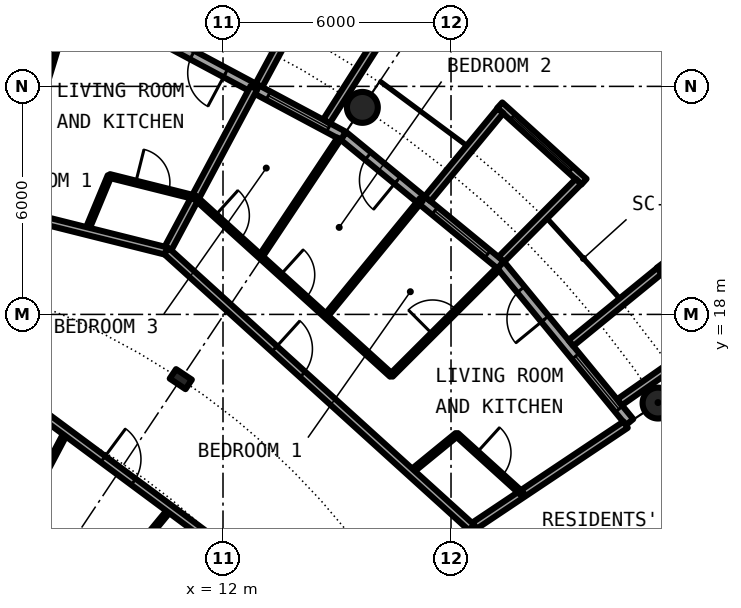
"""IFC4 building model, lengths in metres.
Left out: names, types, materials, properties, quantities, classifications, styles, units other than length and angle.
Written with IfcOpenShell. Run it as: python <this file> out.ifc"""

import sys

from ifc_helpers import new_model, si_unit, direction, frame, frame_2d, origin, origin_2d, place, context, subcontext, project, spatial, rectangle, circle, hollow_circle, i_section, extrude, element, fill, save


model = new_model("IFC4")
c1 = context("Model", 3, precision=1e-05, world=origin(), true_north=direction((0.0, 1.0)))
c2 = subcontext(c1, "Body", "Model", "MODEL_VIEW")
j1 = project(units=[si_unit("LENGTHUNIT", "METRE"), si_unit("PLANEANGLEUNIT", "RADIAN")], contexts=[c1])
p1 = place(None, origin())
s1 = spatial("IfcSite", under=j1, at=p1, CompositionType="ELEMENT")
p2 = place(p1, origin())
s2 = spatial("IfcBuilding", under=s1, at=p2, CompositionType="ELEMENT")
p3 = place(p2, frame((0.0, 0.0, 151.3)))
s3 = spatial("IfcBuildingStorey", under=s2, at=p3, CompositionType="ELEMENT", Elevation=151.3)
for number, where, z_axis, x_axis in (
    (1, (23.448, 15.667, 0.0), (0.0, 0.0, 1.0), (1.0, 0.0, 0.0)),
    (2, (15.667, 23.448, 0.0), (0.0, 0.0, 1.0), (1.0, 0.0, 0.0)),
):
    element("IfcColumn", number, at=place(p3, frame(where, z_axis=z_axis, x_axis=x_axis)), inside=s3, PredefinedType="COLUMN", context=c2, shape_type="SweptSolid", body=[
        extrude(hollow_circle(Radius=0.406, WallThickness=0.04, at=origin_2d()), origin(), (0.0, 0.0, 1.0), 3.05),
    ])
p4 = place(p3, frame((10.889, 16.297, 0.0), z_axis=(0.0, 0.0, 1.0), x_axis=(0.55557023302, 0.831469612303, 0.0)))
e3 = element("IfcColumn", 3, at=p4, inside=s3, PredefinedType="COLUMN", context=c2, shape_type="SweptSolid", body=[
    extrude(i_section(OverallWidth=0.3, OverallDepth=0.5, WebThickness=0.014, FlangeThickness=0.028, FilletRadius=0.027, at=origin_2d()), origin(), (0.0, 0.0, 1.0), 3.05),
])
p5 = place(p3, frame((22.699, 15.167, 0.0), z_axis=(0.0, 0.0, 1.0), x_axis=(-0.634382322723, 0.773019449054, 0.0)))
e4 = element("IfcWall", 4, at=p5, inside=s3, PredefinedType="SOLIDWALL", context=c2, shape_type="SweptSolid", body=[
    extrude(rectangle(XDim=5.352, YDim=0.25, at=frame_2d((2.676, 0.0))), origin(), (0.0, 0.0, 1.0), 2.7),
])
p6 = place(p5, frame((0.441, 0.0, 0.3)))
e5 = element("IfcOpeningElement", 5, at=p6, cuts=e4, PredefinedType="OPENING", context=c2, shape_type="SweptSolid", body=[
    extrude(rectangle(XDim=1.8, YDim=2.1, at=frame_2d((0.9, 1.05))), frame((0.0, 0.135, 0.0), z_axis=(0.0, -1.0, 0.0), x_axis=(1.0, 0.0, 0.0)), (0.0, 0.0, 1.0), 0.27),
])
p7 = place(p5, frame((3.51, 0.0, 0.0)))
e6 = element("IfcOpeningElement", 6, at=p7, cuts=e4, PredefinedType="OPENING", context=c2, shape_type="SweptSolid", body=[
    extrude(rectangle(XDim=1.0, YDim=2.2, at=frame_2d((0.5, 1.1))), frame((0.0, 0.135, 0.0), z_axis=(0.0, -1.0, 0.0), x_axis=(1.0, 0.0, 0.0)), (0.0, 0.0, 1.0), 0.27),
])
p8 = place(p3, frame((24.972, 17.337, -0.03), z_axis=(0.0, 0.0, 1.0), x_axis=(-0.602806268067, 0.797887588059, 0.0)))
e7 = element("IfcWall", 7, at=p8, inside=s3, PredefinedType="SOLIDWALL", context=c2, shape_type="SweptSolid", body=[
    extrude(rectangle(XDim=2.447, YDim=0.2, at=frame_2d((1.223, 0.0))), origin(), (0.0, 0.0, 1.0), 2.73),
])
p9 = place(p8, frame((0.183, 0.0, 0.33)))
e8 = element("IfcOpeningElement", 8, at=p9, cuts=e7, PredefinedType="OPENING", context=c2, shape_type="SweptSolid", body=[
    extrude(circle(Radius=1.04, at=frame_2d((1.04, 1.04))), frame((0.0, 0.11, 0.0), z_axis=(0.0, -1.0, 0.0), x_axis=(1.0, 0.0, 0.0)), (0.0, 0.0, 1.0), 0.22),
])
p10 = place(p3, frame((22.433, 15.688, -0.03), z_axis=(0.0, 0.0, 1.0), x_axis=(0.819373043115, 0.573260687834, 0.0)))
e9 = element("IfcWall", 9, at=p10, inside=s3, PredefinedType="SOLIDWALL", context=c2, shape_type="SweptSolid", body=[
    extrude(rectangle(XDim=2.925, YDim=0.2, at=frame_2d((1.463, 0.0))), origin(), (0.0, 0.0, 1.0), 2.73),
])
p11 = place(p3, frame((21.155, 17.246, -0.03), z_axis=(0.0, 0.0, 1.0), x_axis=(0.775179004516, 0.631741648902, 0.0)))
e10 = element("IfcWall", 10, at=p11, inside=s3, PredefinedType="SOLIDWALL", context=c2, shape_type="SweptSolid", body=[
    extrude(rectangle(XDim=3.006, YDim=0.2, at=frame_2d((1.503, 0.0))), origin(), (0.0, 0.0, 1.0), 2.73),
])
p12 = place(p3, frame((19.304, 19.304, 0.0), z_axis=(0.0, 0.0, 1.0), x_axis=(-0.773019449054, 0.634382322723, 0.0)))
e11 = element("IfcWall", 11, at=p12, inside=s3, PredefinedType="SOLIDWALL", context=c2, shape_type="SweptSolid", body=[
    extrude(rectangle(XDim=5.352, YDim=0.25, at=frame_2d((2.676, 0.0))), origin(), (0.0, 0.0, 1.0), 2.7),
])
p13 = place(p12, frame((0.441, 0.0, 0.3)))
e12 = element("IfcOpeningElement", 12, at=p13, cuts=e11, PredefinedType="OPENING", context=c2, shape_type="SweptSolid", body=[
    extrude(rectangle(XDim=1.8, YDim=2.1, at=frame_2d((0.9, 1.05))), frame((0.0, 0.135, 0.0), z_axis=(0.0, -1.0, 0.0), x_axis=(1.0, 0.0, 0.0)), (0.0, 0.0, 1.0), 0.27),
])
p14 = place(p12, frame((3.51, 0.0, 0.0)))
e13 = element("IfcOpeningElement", 13, at=p14, cuts=e11, PredefinedType="OPENING", context=c2, shape_type="SweptSolid", body=[
    extrude(rectangle(XDim=1.0, YDim=2.2, at=frame_2d((0.5, 1.1))), frame((0.0, 0.135, 0.0), z_axis=(0.0, -1.0, 0.0), x_axis=(1.0, 0.0, 0.0)), (0.0, 0.0, 1.0), 0.27),
])
p15 = place(p3, frame((21.5, 21.493, -0.03), z_axis=(0.0, 0.0, 1.0), x_axis=(-0.740998365753, 0.671506829416, 0.0)))
e14 = element("IfcWall", 14, at=p15, inside=s3, PredefinedType="SOLIDWALL", context=c2, shape_type="SweptSolid", body=[
    extrude(rectangle(XDim=2.993, YDim=0.2, at=frame_2d((1.497, 0.0))), origin(), (0.0, 0.0, 1.0), 2.73),
])
p16 = place(p15, frame((0.457, 0.0, 0.33)))
e15 = element("IfcOpeningElement", 15, at=p16, cuts=e14, PredefinedType="OPENING", context=c2, shape_type="SweptSolid", body=[
    extrude(circle(Radius=1.04, at=frame_2d((1.04, 1.04))), frame((0.0, 0.11, 0.0), z_axis=(0.0, -1.0, 0.0), x_axis=(1.0, 0.0, 0.0)), (0.0, 0.0, 1.0), 0.22),
])
p17 = place(p3, frame((19.323, 19.45, -0.03), z_axis=(0.0, 0.0, 1.0), x_axis=(0.704476739375, 0.709727076896, 0.0)))
e16 = element("IfcWall", 16, at=p17, inside=s3, PredefinedType="SOLIDWALL", context=c2, shape_type="SweptSolid", body=[
    extrude(rectangle(XDim=2.883, YDim=0.2, at=frame_2d((1.441, 0.0))), origin(), (0.0, 0.0, 1.0), 2.73),
])
p18 = place(p3, frame((17.384, 21.041, -0.03), z_axis=(0.0, 0.0, 1.0), x_axis=(0.63709551667, 0.770784861449, 0.0)))
e17 = element("IfcWall", 17, at=p18, inside=s3, PredefinedType="SOLIDWALL", context=c2, shape_type="SweptSolid", body=[
    extrude(rectangle(XDim=3.006, YDim=0.2, at=frame_2d((1.503, 0.0))), origin(), (0.0, 0.0, 1.0), 2.73),
])
p19 = place(p3, frame((15.167, 22.699, 0.0), z_axis=(0.0, 0.0, 1.0), x_axis=(-0.881915646801, 0.471407246368, 0.0)))
e18 = element("IfcWall", 18, at=p19, inside=s3, PredefinedType="SOLIDWALL", context=c2, shape_type="SweptSolid", body=[
    extrude(rectangle(XDim=5.352, YDim=0.25, at=frame_2d((2.676, 0.0))), origin(), (0.0, 0.0, 1.0), 2.7),
])
p20 = place(p19, frame((0.441, 0.0, 0.3)))
e19 = element("IfcOpeningElement", 19, at=p20, cuts=e18, PredefinedType="OPENING", context=c2, shape_type="SweptSolid", body=[
    extrude(rectangle(XDim=1.8, YDim=2.1, at=frame_2d((0.9, 1.05))), frame((0.0, 0.135, 0.0), z_axis=(0.0, -1.0, 0.0), x_axis=(1.0, 0.0, 0.0)), (0.0, 0.0, 1.0), 0.27),
])
p21 = place(p19, frame((3.51, 0.0, 0.0)))
e20 = element("IfcOpeningElement", 20, at=p21, cuts=e18, PredefinedType="OPENING", context=c2, shape_type="SweptSolid", body=[
    extrude(rectangle(XDim=1.0, YDim=2.2, at=frame_2d((0.5, 1.1))), frame((0.0, 0.135, 0.0), z_axis=(0.0, -1.0, 0.0), x_axis=(1.0, 0.0, 0.0)), (0.0, 0.0, 1.0), 0.27),
])
p22 = place(p3, frame((14.722, 23.079, -0.03), z_axis=(0.0, 0.0, 1.0), x_axis=(0.537572179146, 0.843217737129, 0.0)))
e21 = element("IfcWall", 21, at=p22, inside=s3, PredefinedType="SOLIDWALL", context=c2, shape_type="SweptSolid", body=[
    extrude(rectangle(XDim=2.924, YDim=0.2, at=frame_2d((1.462, 0.0))), origin(), (0.0, 0.0, 1.0), 2.73),
])
p23 = place(p3, frame((12.945, 24.029, -0.03), z_axis=(0.0, 0.0, 1.0), x_axis=(0.474424310775, 0.88029629861, 0.0)))
e22 = element("IfcWall", 22, at=p23, inside=s3, PredefinedType="SOLIDWALL", context=c2, shape_type="SweptSolid", body=[
    extrude(rectangle(XDim=3.006, YDim=0.2, at=frame_2d((1.503, 0.0))), origin(), (0.0, 0.0, 1.0), 2.73),
])
p24 = place(p3, frame((8.41, 20.193, 0.0), z_axis=(0.0, 0.0, 1.0), x_axis=(0.384228756538, 0.923237923099, 0.0)))
e23 = element("IfcWall", 23, at=p24, inside=s3, PredefinedType="PARTITIONING", context=c2, shape_type="SweptSolid", body=[
    extrude(rectangle(XDim=1.569, YDim=0.1, at=frame_2d((0.785, 0.0))), origin(), (0.0, 0.0, 1.0), 2.7),
])
p25 = place(p3, frame((4.909, 5.958, 0.0), z_axis=(0.0, 0.0, 1.0), x_axis=(0.635879010442, 0.771788756124, 0.0)))
e24 = element("IfcWall", 24, at=p25, inside=s3, PredefinedType="PARTITIONING", context=c2, shape_type="SweptSolid", body=[
    extrude(rectangle(XDim=8.967, YDim=0.1, at=frame_2d((4.484, 0.0))), origin(), (0.0, 0.0, 1.0), 2.7),
])
p26 = place(p25, frame((6.4, 0.0, 0.0)))
e25 = element("IfcOpeningElement", 25, at=p26, cuts=e24, PredefinedType="OPENING", context=c2, shape_type="SweptSolid", body=[
    extrude(rectangle(XDim=0.9, YDim=2.3, at=frame_2d((0.45, 1.15))), frame((0.0, 0.06, 0.0), z_axis=(0.0, -1.0, 0.0), x_axis=(1.0, 0.0, 0.0)), (0.0, 0.0, 1.0), 0.12),
])
p27 = place(p25, frame((1.917, 0.0, 0.0)))
e26 = element("IfcOpeningElement", 26, at=p27, cuts=e24, PredefinedType="OPENING", context=c2, shape_type="SweptSolid", body=[
    extrude(rectangle(XDim=0.9, YDim=2.3, at=frame_2d((0.45, 1.15))), frame((0.0, 0.06, 0.0), z_axis=(0.0, -1.0, 0.0), x_axis=(1.0, 0.0, 0.0)), (0.0, 0.0, 1.0), 0.12),
])
p28 = place(p3, frame((5.877, 11.125, 0.0), z_axis=(0.0, 0.0, 1.0), x_axis=(0.467030118529, 0.884241408432, 0.0)))
e27 = element("IfcWall", 27, at=p28, inside=s3, PredefinedType="PARTITIONING", context=c2, shape_type="SweptSolid", body=[
    extrude(rectangle(XDim=4.278, YDim=0.1, at=frame_2d((2.139, 0.0))), origin(), (0.0, 0.0, 1.0), 2.7),
])
p29 = place(p28, frame((1.689, 0.0, 0.0)))
e28 = element("IfcOpeningElement", 28, at=p29, cuts=e27, PredefinedType="OPENING", context=c2, shape_type="SweptSolid", body=[
    extrude(rectangle(XDim=0.9, YDim=2.3, at=frame_2d((0.45, 1.15))), frame((0.0, 0.06, 0.0), z_axis=(0.0, -1.0, 0.0), x_axis=(1.0, 0.0, 0.0)), (0.0, 0.0, 1.0), 0.12),
])
p30 = place(p3, frame((6.76, 22.207, 0.0), z_axis=(0.0, 0.0, 1.0), x_axis=(0.291291575636, 0.956634317785, 0.0)))
e29 = element("IfcWall", 29, at=p30, inside=s3, PredefinedType="PARTITIONING", context=c2, shape_type="SweptSolid", body=[
    extrude(rectangle(XDim=3.962, YDim=0.1, at=frame_2d((1.981, 0.0))), origin(), (0.0, 0.0, 1.0), 2.7),
])
p31 = place(p30, frame((1.531, 0.0, 0.0)))
e30 = element("IfcOpeningElement", 30, at=p31, cuts=e29, PredefinedType="OPENING", context=c2, shape_type="SweptSolid", body=[
    extrude(rectangle(XDim=0.9, YDim=2.3, at=frame_2d((0.45, 1.15))), frame((0.0, 0.06, 0.0), z_axis=(0.0, -1.0, 0.0), x_axis=(1.0, 0.0, 0.0)), (0.0, 0.0, 1.0), 0.12),
])
p32 = place(p3, frame((10.516, 19.665, 0.0), z_axis=(0.0, 0.0, 1.0), x_axis=(0.471388689095, 0.881925565903, 0.0)))
e31 = element("IfcWall", 31, at=p32, inside=s3, PredefinedType="PARTITIONING", context=c2, shape_type="SweptSolid", body=[
    extrude(rectangle(XDim=4.875, YDim=0.2, at=frame_2d((2.438, 0.0))), origin(), (0.0, 0.0, 1.0), 2.7),
])
p33 = place(p3, frame((12.988, 19.518, 0.0), z_axis=(0.0, 0.0, 1.0), x_axis=(0.553823887887, 0.83263383381, 0.0)))
e32 = element("IfcWall", 32, at=p33, inside=s3, PredefinedType="PARTITIONING", context=c2, shape_type="SweptSolid", body=[
    extrude(rectangle(XDim=3.73, YDim=0.1, at=frame_2d((1.865, 0.0))), origin(), (0.0, 0.0, 1.0), 2.7),
])
p34 = place(p3, frame((14.709, 17.958, 0.0), z_axis=(0.0, 0.0, 1.0), x_axis=(0.633590098448, 0.773668913133, 0.0)))
e33 = element("IfcWall", 33, at=p34, inside=s3, PredefinedType="PARTITIONING", context=c2, shape_type="SweptSolid", body=[
    extrude(rectangle(XDim=3.962, YDim=0.1, at=frame_2d((1.981, 0.0))), origin(), (0.0, 0.0, 1.0), 2.7),
])
p35 = place(p3, frame((16.43, 16.398, 0.0), z_axis=(0.0, 0.0, 1.0), x_axis=(0.707722727509, 0.706490297858, 0.0)))
e34 = element("IfcWall", 34, at=p35, inside=s3, PredefinedType="PARTITIONING", context=c2, shape_type="SweptSolid", body=[
    extrude(rectangle(XDim=3.962, YDim=0.1, at=frame_2d((1.981, 0.0))), origin(), (0.0, 0.0, 1.0), 2.7),
])
p36 = place(p35, frame((1.531, 0.0, 0.0)))
e35 = element("IfcOpeningElement", 35, at=p36, cuts=e34, PredefinedType="OPENING", context=c2, shape_type="SweptSolid", body=[
    extrude(rectangle(XDim=0.9, YDim=2.3, at=frame_2d((0.45, 1.15))), frame((0.0, 0.06, 0.0), z_axis=(0.0, -1.0, 0.0), x_axis=(1.0, 0.0, 0.0)), (0.0, 0.0, 1.0), 0.12),
])
p37 = place(p3, frame((16.936, 13.845, 0.0), z_axis=(0.0, 0.0, 1.0), x_axis=(0.774283039722, 0.632839453889, 0.0)))
e36 = element("IfcWall", 36, at=p37, inside=s3, PredefinedType="PARTITIONING", context=c2, shape_type="SweptSolid", body=[
    extrude(rectangle(XDim=1.569, YDim=0.1, at=frame_2d((0.785, 0.0))), origin(), (0.0, 0.0, 1.0), 2.7),
])
p38 = place(p3, frame((18.542, 12.389, 0.0), z_axis=(0.0, 0.0, 1.0), x_axis=(0.831387096605, 0.55569370664, 0.0)))
e37 = element("IfcWall", 37, at=p38, inside=s3, PredefinedType="PARTITIONING", context=c2, shape_type="SweptSolid", body=[
    extrude(rectangle(XDim=4.875, YDim=0.2, at=frame_2d((2.438, 0.0))), origin(), (0.0, 0.0, 1.0), 2.7),
])
p39 = place(p3, frame((5.137, 16.938, 0.0), z_axis=(0.0, 0.0, 1.0), x_axis=(0.803229232922, -0.595670042371, 0.0)))
e38 = element("IfcWall", 38, at=p39, inside=s3, PredefinedType="PARTITIONING", context=c2, shape_type="SweptSolid", body=[
    extrude(rectangle(XDim=10.224, YDim=0.2, at=frame_2d((5.112, 0.0))), origin(), (0.0, 0.0, 1.0), 2.7),
])
p40 = place(p39, frame((4.612, 0.0, 0.0)))
e39 = element("IfcOpeningElement", 39, at=p40, cuts=e38, PredefinedType="OPENING", context=c2, shape_type="SweptSolid", body=[
    extrude(rectangle(XDim=1.0, YDim=2.3, at=frame_2d((0.5, 1.15))), frame((0.0, 0.11, 0.0), z_axis=(0.0, -1.0, 0.0), x_axis=(1.0, 0.0, 0.0)), (0.0, 0.0, 1.0), 0.22),
])
p41 = place(p3, frame((-0.006, 22.299, 0.0), z_axis=(0.0, 0.0, 1.0), x_axis=(0.970086843848, -0.242758141765, 0.0)))
e40 = element("IfcWall", 40, at=p41, inside=s3, PredefinedType="PARTITIONING", context=c2, shape_type="SweptSolid", body=[
    extrude(rectangle(XDim=10.842, YDim=0.2, at=frame_2d((5.421, 0.0))), origin(), (0.0, 0.0, 1.0), 2.7),
])
p42 = place(p41, frame((3.841, 0.0, 0.0)))
e41 = element("IfcOpeningElement", 41, at=p42, cuts=e40, PredefinedType="OPENING", context=c2, shape_type="SweptSolid", body=[
    extrude(rectangle(XDim=1.0, YDim=2.3, at=frame_2d((0.5, 1.15))), frame((0.0, 0.11, 0.0), z_axis=(0.0, -1.0, 0.0), x_axis=(1.0, 0.0, 0.0)), (0.0, 0.0, 1.0), 0.22),
])
p43 = place(p3, frame((10.512, 19.667, 0.0), z_axis=(0.0, 0.0, 1.0), x_axis=(0.740947367223, -0.671563101283, 0.0)))
e42 = element("IfcWall", 42, at=p43, inside=s3, PredefinedType="PARTITIONING", context=c2, shape_type="SweptSolid", body=[
    extrude(rectangle(XDim=10.837, YDim=0.2, at=frame_2d((5.419, 0.0))), origin(), (0.0, 0.0, 1.0), 2.7),
])
p44 = place(p43, frame((3.835, 0.0, 0.0)))
e43 = element("IfcOpeningElement", 43, at=p44, cuts=e42, PredefinedType="OPENING", context=c2, shape_type="SweptSolid", body=[
    extrude(rectangle(XDim=1.0, YDim=2.3, at=frame_2d((0.5, 1.15))), frame((0.0, 0.11, 0.0), z_axis=(0.0, -1.0, 0.0), x_axis=(1.0, 0.0, 0.0)), (0.0, 0.0, 1.0), 0.22),
])
p45 = place(p3, frame((18.542, 12.389, 0.0), z_axis=(0.0, 0.0, 1.0), x_axis=(0.465605550524, -0.884992356646, 0.0)))
e44 = element("IfcWall", 44, at=p45, inside=s3, PredefinedType="PARTITIONING", context=c2, shape_type="SweptSolid", body=[
    extrude(rectangle(XDim=1.643, YDim=0.2, at=frame_2d((0.821, 0.0))), origin(), (0.0, 0.0, 1.0), 2.7),
])
p46 = place(p3, frame((9.013, 21.642, 0.0), z_axis=(0.0, 0.0, 1.0), x_axis=(0.970049686104, -0.242906579758, 0.0)))
e45 = element("IfcWall", 45, at=p46, inside=s3, PredefinedType="PARTITIONING", context=c2, shape_type="SweptSolid", body=[
    extrude(rectangle(XDim=2.323, YDim=0.1, at=frame_2d((1.161, 0.0))), origin(), (0.0, 0.0, 1.0), 2.7),
])
p47 = place(p46, frame((0.711, 0.0, 0.0)))
e46 = element("IfcOpeningElement", 46, at=p47, cuts=e45, PredefinedType="OPENING", context=c2, shape_type="SweptSolid", body=[
    extrude(rectangle(XDim=0.9, YDim=2.3, at=frame_2d((0.45, 1.15))), frame((0.0, 0.06, 0.0), z_axis=(0.0, -1.0, 0.0), x_axis=(1.0, 0.0, 0.0)), (0.0, 0.0, 1.0), 0.12),
])
p48 = place(p3, frame((11.266, 21.078, 0.0), z_axis=(0.0, 0.0, 1.0), x_axis=(0.74097115376, -0.671536856245, 0.0)))
e47 = element("IfcWall", 47, at=p48, inside=s3, PredefinedType="PARTITIONING", context=c2, shape_type="SweptSolid", body=[
    extrude(rectangle(XDim=6.969, YDim=0.1, at=frame_2d((3.484, 0.0))), origin(), (0.0, 0.0, 1.0), 2.7),
])
p49 = place(p48, frame((3.034, 0.0, 0.0)))
e48 = element("IfcOpeningElement", 48, at=p49, cuts=e47, PredefinedType="OPENING", context=c2, shape_type="SweptSolid", body=[
    extrude(rectangle(XDim=0.9, YDim=2.3, at=frame_2d((0.45, 1.15))), frame((0.0, 0.06, 0.0), z_axis=(0.0, -1.0, 0.0), x_axis=(1.0, 0.0, 0.0)), (0.0, 0.0, 1.0), 0.12),
])
p50 = place(p48, frame((0.712, 0.0, 0.0)))
e49 = element("IfcOpeningElement", 49, at=p50, cuts=e47, PredefinedType="OPENING", context=c2, shape_type="SweptSolid", body=[
    extrude(rectangle(XDim=0.9, YDim=2.3, at=frame_2d((0.45, 1.15))), frame((0.0, 0.06, 0.0), z_axis=(0.0, -1.0, 0.0), x_axis=(1.0, 0.0, 0.0)), (0.0, 0.0, 1.0), 0.12),
])
p51 = place(p3, frame((18.149, 14.84, 0.0), z_axis=(0.0, 0.0, 1.0), x_axis=(0.741127434804, -0.671364376014, 0.0)))
e50 = element("IfcWall", 50, at=p51, inside=s3, PredefinedType="PARTITIONING", context=c2, shape_type="SweptSolid", body=[
    extrude(rectangle(XDim=2.324, YDim=0.1, at=frame_2d((1.162, 0.0))), origin(), (0.0, 0.0, 1.0), 2.7),
])
p52 = place(p51, frame((0.714, 0.0, 0.0)))
e51 = element("IfcOpeningElement", 51, at=p52, cuts=e50, PredefinedType="OPENING", context=c2, shape_type="SweptSolid", body=[
    extrude(rectangle(XDim=0.9, YDim=2.3, at=frame_2d((0.45, 1.15))), frame((0.0, 0.06, 0.0), z_axis=(0.0, -1.0, 0.0), x_axis=(1.0, 0.0, 0.0)), (0.0, 0.0, 1.0), 0.12),
])
p53 = place(p6, origin())
e52 = element("IfcWindow", 52, at=p53, inside=s3, PartitioningType="SINGLE_PANEL", PredefinedType="WINDOW", context=c2, shape_type="SweptSolid", body=[
    extrude(rectangle(XDim=1.8, YDim=2.1, at=frame_2d((0.9, 1.05))), frame((0.0, 0.03, 0.0), z_axis=(0.0, -1.0, 0.0), x_axis=(1.0, 0.0, 0.0)), (0.0, 0.0, 1.0), 0.06),
])
fill(e5, e52)
p54 = place(p7, origin())
e53 = element("IfcDoor", 53, at=p54, inside=s3, OperationType="SINGLE_SWING_LEFT", PredefinedType="DOOR", context=c2, shape_type="SweptSolid", body=[
    extrude(rectangle(XDim=1.0, YDim=2.2, at=frame_2d((0.5, 1.1))), frame((0.0, 0.025, 0.0), z_axis=(0.0, -1.0, 0.0), x_axis=(1.0, 0.0, 0.0)), (0.0, 0.0, 1.0), 0.05),
])
fill(e6, e53)
p55 = place(p13, origin())
e54 = element("IfcWindow", 54, at=p55, inside=s3, PartitioningType="SINGLE_PANEL", PredefinedType="WINDOW", context=c2, shape_type="SweptSolid", body=[
    extrude(rectangle(XDim=1.8, YDim=2.1, at=frame_2d((0.9, 1.05))), frame((0.0, 0.03, 0.0), z_axis=(0.0, -1.0, 0.0), x_axis=(1.0, 0.0, 0.0)), (0.0, 0.0, 1.0), 0.06),
])
fill(e12, e54)
p56 = place(p16, origin())
e55 = element("IfcWindow", 55, at=p56, inside=s3, PartitioningType="SINGLE_PANEL", PredefinedType="WINDOW", context=c2, shape_type="SweptSolid", body=[
    extrude(circle(Radius=1.04, at=frame_2d((1.04, 1.04))), frame((0.0, 0.03, 0.0), z_axis=(0.0, -1.0, 0.0), x_axis=(1.0, 0.0, 0.0)), (0.0, 0.0, 1.0), 0.06),
])
fill(e15, e55)
p57 = place(p14, origin())
e56 = element("IfcDoor", 56, at=p57, inside=s3, OperationType="SINGLE_SWING_LEFT", PredefinedType="DOOR", context=c2, shape_type="SweptSolid", body=[
    extrude(rectangle(XDim=1.0, YDim=2.2, at=frame_2d((0.5, 1.1))), frame((0.0, 0.025, 0.0), z_axis=(0.0, -1.0, 0.0), x_axis=(1.0, 0.0, 0.0)), (0.0, 0.0, 1.0), 0.05),
])
fill(e13, e56)
p58 = place(p20, origin())
e57 = element("IfcWindow", 57, at=p58, inside=s3, PartitioningType="SINGLE_PANEL", PredefinedType="WINDOW", context=c2, shape_type="SweptSolid", body=[
    extrude(rectangle(XDim=1.8, YDim=2.1, at=frame_2d((0.9, 1.05))), frame((0.0, 0.03, 0.0), z_axis=(0.0, -1.0, 0.0), x_axis=(1.0, 0.0, 0.0)), (0.0, 0.0, 1.0), 0.06),
])
fill(e19, e57)
p59 = place(p21, origin())
e58 = element("IfcDoor", 58, at=p59, inside=s3, OperationType="SINGLE_SWING_LEFT", PredefinedType="DOOR", context=c2, shape_type="SweptSolid", body=[
    extrude(rectangle(XDim=1.0, YDim=2.2, at=frame_2d((0.5, 1.1))), frame((0.0, 0.025, 0.0), z_axis=(0.0, -1.0, 0.0), x_axis=(1.0, 0.0, 0.0)), (0.0, 0.0, 1.0), 0.05),
])
fill(e20, e58)
p60 = place(p44, origin())
e59 = element("IfcDoor", 59, at=p60, inside=s3, OperationType="SINGLE_SWING_LEFT", PredefinedType="DOOR", context=c2, shape_type="SweptSolid", body=[
    extrude(rectangle(XDim=1.0, YDim=2.3, at=frame_2d((0.5, 1.15))), frame((0.0, 0.025, 0.0), z_axis=(0.0, -1.0, 0.0), x_axis=(1.0, 0.0, 0.0)), (0.0, 0.0, 1.0), 0.05),
])
fill(e43, e59)
p61 = place(p52, origin())
e60 = element("IfcDoor", 60, at=p61, inside=s3, OperationType="SINGLE_SWING_RIGHT", PredefinedType="DOOR", context=c2, shape_type="SweptSolid", body=[
    extrude(rectangle(XDim=0.9, YDim=2.3, at=frame_2d((0.45, 1.15))), frame((0.0, 0.025, 0.0), z_axis=(0.0, -1.0, 0.0), x_axis=(1.0, 0.0, 0.0)), (0.0, 0.0, 1.0), 0.05),
])
fill(e51, e60)
p62 = place(p36, origin())
e61 = element("IfcDoor", 61, at=p62, inside=s3, OperationType="SINGLE_SWING_RIGHT", PredefinedType="DOOR", context=c2, shape_type="SweptSolid", body=[
    extrude(rectangle(XDim=0.9, YDim=2.3, at=frame_2d((0.45, 1.15))), frame((0.0, 0.025, 0.0), z_axis=(0.0, -1.0, 0.0), x_axis=(1.0, 0.0, 0.0)), (0.0, 0.0, 1.0), 0.05),
])
fill(e35, e61)
p63 = place(p49, origin())
e62 = element("IfcDoor", 62, at=p63, inside=s3, OperationType="SINGLE_SWING_LEFT", PredefinedType="DOOR", context=c2, shape_type="SweptSolid", body=[
    extrude(rectangle(XDim=0.9, YDim=2.3, at=frame_2d((0.45, 1.15))), frame((0.0, 0.025, 0.0), z_axis=(0.0, -1.0, 0.0), x_axis=(1.0, 0.0, 0.0)), (0.0, 0.0, 1.0), 0.05),
])
fill(e48, e62)
p64 = place(p50, origin())
e63 = element("IfcDoor", 63, at=p64, inside=s3, OperationType="SINGLE_SWING_LEFT", PredefinedType="DOOR", context=c2, shape_type="SweptSolid", body=[
    extrude(rectangle(XDim=0.9, YDim=2.3, at=frame_2d((0.45, 1.15))), frame((0.0, 0.025, 0.0), z_axis=(0.0, -1.0, 0.0), x_axis=(1.0, 0.0, 0.0)), (0.0, 0.0, 1.0), 0.05),
])
fill(e49, e63)
p65 = place(p47, origin())
e64 = element("IfcDoor", 64, at=p65, inside=s3, OperationType="SINGLE_SWING_RIGHT", PredefinedType="DOOR", context=c2, shape_type="SweptSolid", body=[
    extrude(rectangle(XDim=0.9, YDim=2.3, at=frame_2d((0.45, 1.15))), frame((0.0, 0.025, 0.0), z_axis=(0.0, -1.0, 0.0), x_axis=(1.0, 0.0, 0.0)), (0.0, 0.0, 1.0), 0.05),
])
fill(e46, e64)
p66 = place(p40, origin())
e65 = element("IfcDoor", 65, at=p66, inside=s3, OperationType="SINGLE_SWING_RIGHT", PredefinedType="DOOR", context=c2, shape_type="SweptSolid", body=[
    extrude(rectangle(XDim=1.0, YDim=2.3, at=frame_2d((0.5, 1.15))), frame((0.0, 0.025, 0.0), z_axis=(0.0, -1.0, 0.0), x_axis=(1.0, 0.0, 0.0)), (0.0, 0.0, 1.0), 0.05),
])
fill(e39, e65)
save(model, sys.argv[1])
